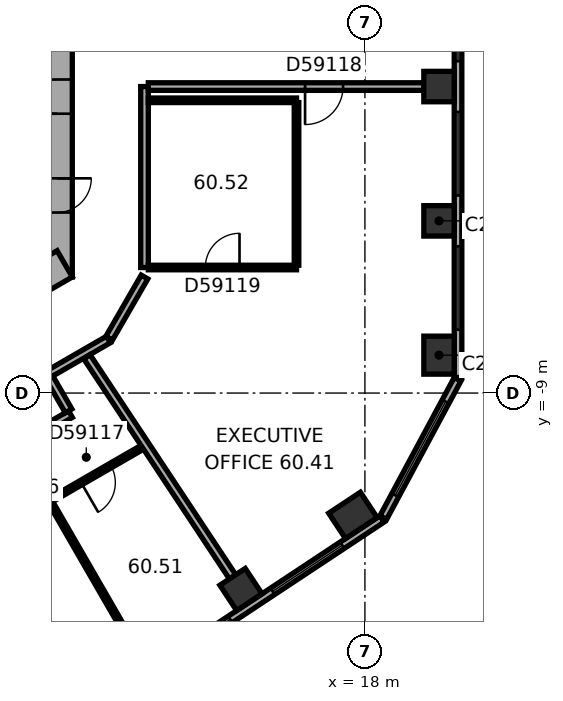
"""IFC4 building model, lengths in metres.
Left out: names, types, materials, properties, quantities, classifications, styles, units other than length and angle.
Written with IfcOpenShell. Run it as: python <this file> out.ifc"""

import sys

from ifc_helpers import new_model, si_unit, direction, frame, frame_2d, origin, origin_2d, place, context, subcontext, project, spatial, rectangle, extrude, element, fill, save


model = new_model("IFC4")
c1 = context("Model", 3, precision=1e-05, world=origin(), true_north=direction((0.0, 1.0)))
c2 = subcontext(c1, "Body", "Model", "MODEL_VIEW")
j1 = project(units=[si_unit("LENGTHUNIT", "METRE"), si_unit("PLANEANGLEUNIT", "RADIAN")], contexts=[c1])
p1 = place(None, origin())
s1 = spatial("IfcSite", under=j1, at=p1, CompositionType="ELEMENT")
p2 = place(p1, origin())
s2 = spatial("IfcBuilding", under=s1, at=p2, CompositionType="ELEMENT")
p3 = place(p2, frame((0.0, 0.0, 243.9)))
s3 = spatial("IfcBuildingStorey", under=s2, at=p3, CompositionType="ELEMENT", Elevation=243.9)
p4 = place(p3, frame((19.95, -8.003, 0.0), z_axis=(0.0, 0.0, 1.0), x_axis=(0.0, 1.0, 0.0)))
e1 = element("IfcColumn", 1, at=p4, inside=s3, PredefinedType="COLUMN", context=c2, shape_type="SweptSolid", body=[
    extrude(rectangle(XDim=1.0, YDim=0.8, at=origin_2d()), origin(), (0.0, 0.0, 1.0), 3.7),
])
for number, where, z_axis, x_axis in (
    (2, (19.95, -4.469, 0.0), (0.0, 0.0, 1.0), (0.0, 1.0, 0.0)),
    (3, (19.95, -0.936, 0.0), (0.0, 0.0, 1.0), (0.0, 1.0, 0.0)),
    (4, (14.738, -14.169, 0.0), (0.0, 0.0, 1.0), (0.834, 0.552, 0.0)),
):
    element("IfcColumn", number, at=place(p3, frame(where, z_axis=z_axis, x_axis=x_axis)), inside=s3, PredefinedType="COLUMN", context=c2, shape_type="SweptSolid", body=[
        extrude(rectangle(XDim=0.8, YDim=0.8, at=origin_2d()), origin(), (0.0, 0.0, 1.0), 3.7),
    ])
p5 = place(p3, frame((17.685, -12.219, 0.0), z_axis=(0.0, 0.0, 1.0), x_axis=(0.833885822067, 0.551936985312, 0.0)))
e5 = element("IfcColumn", 5, at=p5, inside=s3, PredefinedType="COLUMN", context=c2, shape_type="SweptSolid", body=[
    extrude(rectangle(XDim=1.0, YDim=0.8, at=origin_2d()), origin(), (0.0, 0.0, 1.0), 3.7),
])
p6 = place(p3, frame((9.9, -5.947, 0.0), z_axis=(0.0, 0.0, 1.0), x_axis=(0.0, 1.0, 0.0)))
e6 = element("IfcWall", 6, at=p6, inside=s3, PredefinedType="SHEAR", context=c2, shape_type="SweptSolid", body=[
    extrude(rectangle(XDim=11.894, YDim=0.8, at=frame_2d((5.947, 0.0))), origin(), (0.0, 0.0, 1.0), 3.7),
])
p7 = place(p6, frame((6.147, 0.0, 0.0)))
e7 = element("IfcOpeningElement", 7, at=p7, cuts=e6, PredefinedType="OPENING", context=c2, shape_type="SweptSolid", body=[
    extrude(rectangle(XDim=1.5, YDim=2.1, at=frame_2d((0.75, 1.05))), frame((0.0, 0.41, 0.0), z_axis=(0.0, -1.0, 0.0), x_axis=(1.0, 0.0, 0.0)), (0.0, 0.0, 1.0), 0.82),
])
p8 = place(p6, frame((1.697, 0.0, 0.0)))
e8 = element("IfcOpeningElement", 8, at=p8, cuts=e6, PredefinedType="OPENING", context=c2, shape_type="SweptSolid", body=[
    extrude(rectangle(XDim=0.9, YDim=2.1, at=frame_2d((0.45, 1.05))), frame((0.0, 0.41, 0.0), z_axis=(0.0, -1.0, 0.0), x_axis=(1.0, 0.0, 0.0)), (0.0, 0.0, 1.0), 0.82),
])
p9 = place(p6, frame((4.297, 0.0, 0.0)))
e9 = element("IfcOpeningElement", 9, at=p9, cuts=e6, PredefinedType="OPENING", context=c2, shape_type="SweptSolid", body=[
    extrude(rectangle(XDim=0.9, YDim=2.1, at=frame_2d((0.45, 1.05))), frame((0.0, 0.41, 0.0), z_axis=(0.0, -1.0, 0.0), x_axis=(1.0, 0.0, 0.0)), (0.0, 0.0, 1.0), 0.82),
])
p10 = place(p3, frame((-0.2, -11.547, 0.0), z_axis=(0.0, 0.0, 1.0), x_axis=(0.866023897231, 0.500002609418, 0.0)))
e10 = element("IfcWall", 10, at=p10, inside=s3, PredefinedType="SHEAR", context=c2, shape_type="SweptSolid", body=[
    extrude(rectangle(XDim=11.894, YDim=0.8, at=frame_2d((5.947, 0.0))), origin(), (0.0, 0.0, 1.0), 3.7),
])
p11 = place(p10, frame((2.497, 0.0, 0.0)))
e11 = element("IfcOpeningElement", 11, at=p11, cuts=e10, PredefinedType="OPENING", context=c2, shape_type="SweptSolid", body=[
    extrude(rectangle(XDim=1.1, YDim=2.1, at=frame_2d((0.55, 1.05))), frame((0.0, 0.41, 0.0), z_axis=(0.0, -1.0, 0.0), x_axis=(1.0, 0.0, 0.0)), (0.0, 0.0, 1.0), 0.82),
])
p12 = place(p10, frame((5.097, 0.0, 0.0)))
e12 = element("IfcOpeningElement", 12, at=p12, cuts=e10, PredefinedType="OPENING", context=c2, shape_type="SweptSolid", body=[
    extrude(rectangle(XDim=1.1, YDim=2.1, at=frame_2d((0.55, 1.05))), frame((0.0, 0.41, 0.0), z_axis=(0.0, -1.0, 0.0), x_axis=(1.0, 0.0, 0.0)), (0.0, 0.0, 1.0), 0.82),
])
p13 = place(p10, frame((7.697, 0.0, 0.0)))
e13 = element("IfcOpeningElement", 13, at=p13, cuts=e10, PredefinedType="OPENING", context=c2, shape_type="SweptSolid", body=[
    extrude(rectangle(XDim=1.1, YDim=2.1, at=frame_2d((0.55, 1.05))), frame((0.0, 0.41, 0.0), z_axis=(0.0, -1.0, 0.0), x_axis=(1.0, 0.0, 0.0)), (0.0, 0.0, 1.0), 0.82),
])
p14 = place(p3, frame((20.45, -8.59, 0.0), z_axis=(0.0, 0.0, 1.0), x_axis=(0.0, 1.0, 0.0)))
e14 = element("IfcWall", 14, at=p14, inside=s3, PredefinedType="STANDARD", context=c2, shape_type="SweptSolid", body=[
    extrude(rectangle(XDim=18.841, YDim=0.2, at=frame_2d((9.421, 0.0))), origin(), (0.0, 0.0, 1.0), 3.7),
])
p15 = place(p14, frame((1.254, 0.0, 0.9)))
e15 = element("IfcOpeningElement", 15, at=p15, cuts=e14, PredefinedType="OPENING", context=c2, shape_type="SweptSolid", body=[
    extrude(rectangle(XDim=2.2, YDim=2.0, at=frame_2d((1.1, 1.0))), frame((0.0, 0.11, 0.0), z_axis=(0.0, -1.0, 0.0), x_axis=(1.0, 0.0, 0.0)), (0.0, 0.0, 1.0), 0.22),
])
p16 = place(p14, frame((4.788, 0.0, 0.9)))
e16 = element("IfcOpeningElement", 16, at=p16, cuts=e14, PredefinedType="OPENING", context=c2, shape_type="SweptSolid", body=[
    extrude(rectangle(XDim=2.2, YDim=2.0, at=frame_2d((1.1, 1.0))), frame((0.0, 0.11, 0.0), z_axis=(0.0, -1.0, 0.0), x_axis=(1.0, 0.0, 0.0)), (0.0, 0.0, 1.0), 0.22),
])
p17 = place(p14, frame((8.322, 0.0, 0.9)))
e17 = element("IfcOpeningElement", 17, at=p17, cuts=e14, PredefinedType="OPENING", context=c2, shape_type="SweptSolid", body=[
    extrude(rectangle(XDim=2.2, YDim=2.0, at=frame_2d((1.1, 1.0))), frame((0.0, 0.11, 0.0), z_axis=(0.0, -1.0, 0.0), x_axis=(1.0, 0.0, 0.0)), (0.0, 0.0, 1.0), 0.22),
])
p18 = place(p14, frame((11.855, 0.0, 0.9)))
e18 = element("IfcOpeningElement", 18, at=p18, cuts=e14, PredefinedType="OPENING", context=c2, shape_type="SweptSolid", body=[
    extrude(rectangle(XDim=2.2, YDim=2.0, at=frame_2d((1.1, 1.0))), frame((0.0, 0.11, 0.0), z_axis=(0.0, -1.0, 0.0), x_axis=(1.0, 0.0, 0.0)), (0.0, 0.0, 1.0), 0.22),
])
p19 = place(p14, frame((15.389, 0.0, 0.9)))
e19 = element("IfcOpeningElement", 19, at=p19, cuts=e14, PredefinedType="OPENING", context=c2, shape_type="SweptSolid", body=[
    extrude(rectangle(XDim=2.2, YDim=2.0, at=frame_2d((1.1, 1.0))), frame((0.0, 0.11, 0.0), z_axis=(0.0, -1.0, 0.0), x_axis=(1.0, 0.0, 0.0)), (0.0, 0.0, 1.0), 0.22),
])
p20 = place(p3, frame((2.739, -22.711, 0.0), z_axis=(0.0, 0.0, 1.0), x_axis=(0.833885723098, 0.551937134838, 0.0)))
e20 = element("IfcWall", 20, at=p20, inside=s3, PredefinedType="STANDARD", context=c2, shape_type="SweptSolid", body=[
    extrude(rectangle(XDim=18.841, YDim=0.2, at=frame_2d((9.421, 0.0))), origin(), (0.0, 0.0, 1.0), 3.7),
])
p21 = place(p20, frame((1.252, 0.0, 0.9)))
e21 = element("IfcOpeningElement", 21, at=p21, cuts=e20, PredefinedType="OPENING", context=c2, shape_type="SweptSolid", body=[
    extrude(rectangle(XDim=2.2, YDim=2.0, at=frame_2d((1.1, 1.0))), frame((0.0, 0.11, 0.0), z_axis=(0.0, -1.0, 0.0), x_axis=(1.0, 0.0, 0.0)), (0.0, 0.0, 1.0), 0.22),
])
p22 = place(p20, frame((4.786, 0.0, 0.9)))
e22 = element("IfcOpeningElement", 22, at=p22, cuts=e20, PredefinedType="OPENING", context=c2, shape_type="SweptSolid", body=[
    extrude(rectangle(XDim=2.2, YDim=2.0, at=frame_2d((1.1, 1.0))), frame((0.0, 0.11, 0.0), z_axis=(0.0, -1.0, 0.0), x_axis=(1.0, 0.0, 0.0)), (0.0, 0.0, 1.0), 0.22),
])
p23 = place(p20, frame((8.32, 0.0, 0.9)))
e23 = element("IfcOpeningElement", 23, at=p23, cuts=e20, PredefinedType="OPENING", context=c2, shape_type="SweptSolid", body=[
    extrude(rectangle(XDim=2.2, YDim=2.0, at=frame_2d((1.1, 1.0))), frame((0.0, 0.11, 0.0), z_axis=(0.0, -1.0, 0.0), x_axis=(1.0, 0.0, 0.0)), (0.0, 0.0, 1.0), 0.22),
])
p24 = place(p20, frame((11.854, 0.0, 0.9)))
e24 = element("IfcOpeningElement", 24, at=p24, cuts=e20, PredefinedType="OPENING", context=c2, shape_type="SweptSolid", body=[
    extrude(rectangle(XDim=2.2, YDim=2.0, at=frame_2d((1.1, 1.0))), frame((0.0, 0.11, 0.0), z_axis=(0.0, -1.0, 0.0), x_axis=(1.0, 0.0, 0.0)), (0.0, 0.0, 1.0), 0.22),
])
p25 = place(p20, frame((15.387, 0.0, 0.9)))
e25 = element("IfcOpeningElement", 25, at=p25, cuts=e20, PredefinedType="OPENING", context=c2, shape_type="SweptSolid", body=[
    extrude(rectangle(XDim=2.2, YDim=2.0, at=frame_2d((1.1, 1.0))), frame((0.0, 0.11, 0.0), z_axis=(0.0, -1.0, 0.0), x_axis=(1.0, 0.0, 0.0)), (0.0, 0.0, 1.0), 0.22),
])
p26 = place(p3, frame((18.483, -12.276, 0.0), z_axis=(0.0, 0.0, 1.0), x_axis=(0.473267675015, 0.880918672629, 0.0)))
e26 = element("IfcWall", 26, at=p26, inside=s3, PredefinedType="STANDARD", context=c2, shape_type="SweptSolid", body=[
    extrude(rectangle(XDim=4.13, YDim=0.2, at=frame_2d((2.065, 0.0))), origin(), (0.0, 0.0, 1.0), 3.7),
])
p27 = place(p26, frame((0.665, 0.0, 0.9)))
e27 = element("IfcOpeningElement", 27, at=p27, cuts=e26, PredefinedType="OPENING", context=c2, shape_type="SweptSolid", body=[
    extrude(rectangle(XDim=2.8, YDim=2.0, at=frame_2d((1.4, 1.0))), frame((0.0, 0.11, 0.0), z_axis=(0.0, -1.0, 0.0), x_axis=(1.0, 0.0, 0.0)), (0.0, 0.0, 1.0), 0.22),
])
p28 = place(p3, frame((2.716, -13.906, 0.0), z_axis=(0.0, 0.0, 1.0), x_axis=(0.866040290674, 0.499974214264, 0.0)))
e28 = element("IfcWall", 28, at=p28, inside=s3, PredefinedType="PARTITIONING", context=c2, shape_type="SweptSolid", body=[
    extrude(rectangle(XDim=8.702, YDim=0.2, at=frame_2d((4.351, 0.0))), origin(), (0.0, 0.0, 1.0), 3.42),
])
p29 = place(p28, frame((5.26, 0.0, 0.0)))
e29 = element("IfcOpeningElement", 29, at=p29, cuts=e28, PredefinedType="OPENING", context=c2, shape_type="SweptSolid", body=[
    extrude(rectangle(XDim=1.0, YDim=2.1, at=frame_2d((0.5, 1.05))), frame((0.0, 0.11, 0.0), z_axis=(0.0, -1.0, 0.0), x_axis=(1.0, 0.0, 0.0)), (0.0, 0.0, 1.0), 0.22),
])
p30 = place(p3, frame((6.183, -13.867, 0.0), z_axis=(0.0, 0.0, 1.0), x_axis=(0.866031365477, 0.499989673903, 0.0)))
e30 = element("IfcWall", 30, at=p30, inside=s3, PredefinedType="PARTITIONING", context=c2, shape_type="SweptSolid", body=[
    extrude(rectangle(XDim=6.881, YDim=0.12, at=frame_2d((3.44, 0.0))), origin(), (0.0, 0.0, 1.0), 3.42),
])
p31 = place(p30, frame((0.5, 0.0, 0.0)))
e31 = element("IfcOpeningElement", 31, at=p31, cuts=e30, PredefinedType="OPENING", context=c2, shape_type="SweptSolid", body=[
    extrude(rectangle(XDim=1.0, YDim=2.1, at=frame_2d((0.5, 1.05))), frame((0.0, 0.07, 0.0), z_axis=(0.0, -1.0, 0.0), x_axis=(1.0, 0.0, 0.0)), (0.0, 0.0, 1.0), 0.14),
])
p32 = place(p30, frame((2.583, 0.0, 0.0)))
e32 = element("IfcOpeningElement", 32, at=p32, cuts=e30, PredefinedType="OPENING", context=c2, shape_type="SweptSolid", body=[
    extrude(rectangle(XDim=0.9, YDim=2.1, at=frame_2d((0.45, 1.05))), frame((0.0, 0.07, 0.0), z_axis=(0.0, -1.0, 0.0), x_axis=(1.0, 0.0, 0.0)), (0.0, 0.0, 1.0), 0.14),
])
p33 = place(p30, frame((5.023, 0.0, 0.0)))
e33 = element("IfcOpeningElement", 33, at=p33, cuts=e30, PredefinedType="OPENING", context=c2, shape_type="SweptSolid", body=[
    extrude(rectangle(XDim=0.9, YDim=2.1, at=frame_2d((0.45, 1.05))), frame((0.0, 0.07, 0.0), z_axis=(0.0, -1.0, 0.0), x_axis=(1.0, 0.0, 0.0)), (0.0, 0.0, 1.0), 0.14),
])
p34 = place(p3, frame((9.652, -8.515, 0.0), z_axis=(0.0, 0.0, 1.0), x_axis=(0.866020375458, 0.500008709215, 0.0)))
e34 = element("IfcWall", 34, at=p34, inside=s3, PredefinedType="PARTITIONING", context=c2, shape_type="SweptSolid", body=[
    extrude(rectangle(XDim=1.846, YDim=0.2, at=frame_2d((0.923, 0.0))), origin(), (0.0, 0.0, 1.0), 3.42),
])
p35 = place(p3, frame((10.202, -9.469, 0.0), z_axis=(0.0, 0.0, 1.0), x_axis=(-0.499968756647, 0.866043441391, 0.0)))
e35 = element("IfcWall", 35, at=p35, inside=s3, PredefinedType="PARTITIONING", context=c2, shape_type="SweptSolid", body=[
    extrude(rectangle(XDim=1.001, YDim=0.2, at=frame_2d((0.5, 0.0))), origin(), (0.0, 0.0, 1.0), 3.42),
])
p36 = place(p3, frame((11.27, -7.558, 0.0), z_axis=(0.0, 0.0, 1.0), x_axis=(0.499964847546, 0.866045698112, 0.0)))
e36 = element("IfcWall", 36, at=p36, inside=s3, PredefinedType="PARTITIONING", context=c2, shape_type="SweptSolid", body=[
    extrude(rectangle(XDim=1.86, YDim=0.2, at=frame_2d((0.93, 0.0))), origin(), (0.0, 0.0, 1.0), 3.42),
])
p37 = place(p3, frame((11.87, -15.588, 0.0), z_axis=(0.0, 0.0, 1.0), x_axis=(-0.49999774064, 0.866026708223, 0.0)))
e37 = element("IfcWall", 37, at=p37, inside=s3, PredefinedType="PARTITIONING", context=c2, shape_type="SweptSolid", body=[
    extrude(rectangle(XDim=4.273, YDim=0.12, at=frame_2d((2.137, 0.0))), origin(), (0.0, 0.0, 1.0), 3.42),
])
p38 = place(p3, frame((12.2, -5.697, 0.0), z_axis=(0.0, 0.0, 1.0), x_axis=(0.0, 1.0, 0.0)))
e38 = element("IfcWall", 38, at=p38, inside=s3, PredefinedType="PARTITIONING", context=c2, shape_type="SweptSolid", body=[
    extrude(rectangle(XDim=4.761, YDim=0.2, at=frame_2d((2.381, 0.0))), origin(), (0.0, 0.0, 1.0), 3.42),
])
p39 = place(p3, frame((12.3, -1.297, 0.0), z_axis=(0.0, 0.0, 1.0), x_axis=(1.0, 0.0, 0.0)))
e39 = element("IfcWall", 39, at=p39, inside=s3, PredefinedType="PARTITIONING", context=c2, shape_type="SweptSolid", body=[
    extrude(rectangle(XDim=3.9, YDim=0.12, at=frame_2d((1.95, 0.0))), origin(), (0.0, 0.0, 1.0), 3.42),
])
p40 = place(p3, frame((12.3, -0.936, 0.0), z_axis=(0.0, 0.0, 1.0), x_axis=(1.0, 0.0, 0.0)))
e40 = element("IfcWall", 40, at=p40, inside=s3, PredefinedType="PARTITIONING", context=c2, shape_type="SweptSolid", body=[
    extrude(rectangle(XDim=7.25, YDim=0.2, at=frame_2d((3.625, 0.0))), origin(), (0.0, 0.0, 1.0), 2.87),
])
p41 = place(p40, frame((4.125, 0.0, 0.0)))
e41 = element("IfcOpeningElement", 41, at=p41, cuts=e40, PredefinedType="OPENING", context=c2, shape_type="SweptSolid", body=[
    extrude(rectangle(XDim=1.0, YDim=2.1, at=frame_2d((0.5, 1.05))), frame((0.0, 0.11, 0.0), z_axis=(0.0, -1.0, 0.0), x_axis=(1.0, 0.0, 0.0)), (0.0, 0.0, 1.0), 0.22),
])
p42 = place(p3, frame((14.517, -13.836, 0.0), z_axis=(0.0, 0.0, 1.0), x_axis=(-0.551938455794, 0.833884848775, 0.0)))
e42 = element("IfcWall", 42, at=p42, inside=s3, PredefinedType="PARTITIONING", context=c2, shape_type="SweptSolid", body=[
    extrude(rectangle(XDim=6.944, YDim=0.2, at=frame_2d((3.472, 0.0))), origin(), (0.0, 0.0, 1.0), 2.87),
])
p43 = place(p3, frame((16.2, -5.697, 0.0), z_axis=(0.0, 0.0, 1.0), x_axis=(-1.0, 0.0, 0.0)))
e43 = element("IfcWall", 43, at=p43, inside=s3, PredefinedType="PARTITIONING", context=c2, shape_type="SweptSolid", body=[
    extrude(rectangle(XDim=3.9, YDim=0.12, at=frame_2d((1.95, 0.0))), origin(), (0.0, 0.0, 1.0), 3.42),
])
p44 = place(p43, frame((1.5, 0.0, 0.0)))
e44 = element("IfcOpeningElement", 44, at=p44, cuts=e43, PredefinedType="OPENING", context=c2, shape_type="SweptSolid", body=[
    extrude(rectangle(XDim=0.9, YDim=2.1, at=frame_2d((0.45, 1.05))), frame((0.0, 0.07, 0.0), z_axis=(0.0, -1.0, 0.0), x_axis=(1.0, 0.0, 0.0)), (0.0, 0.0, 1.0), 0.14),
])
p45 = place(p3, frame((16.2, -1.357, 0.0), z_axis=(0.0, 0.0, 1.0), x_axis=(0.0, -1.0, 0.0)))
e45 = element("IfcWall", 45, at=p45, inside=s3, PredefinedType="PARTITIONING", context=c2, shape_type="SweptSolid", body=[
    extrude(rectangle(XDim=4.28, YDim=0.12, at=frame_2d((2.14, 0.0))), origin(), (0.0, 0.0, 1.0), 3.42),
])
p46 = place(p15, origin())
e46 = element("IfcWindow", 46, at=p46, inside=s3, PartitioningType="SINGLE_PANEL", PredefinedType="WINDOW", context=c2, shape_type="SweptSolid", body=[
    extrude(rectangle(XDim=2.2, YDim=2.0, at=frame_2d((1.1, 1.0))), frame((0.0, 0.03, 0.0), z_axis=(0.0, -1.0, 0.0), x_axis=(1.0, 0.0, 0.0)), (0.0, 0.0, 1.0), 0.06),
])
fill(e15, e46)
p47 = place(p16, origin())
e47 = element("IfcWindow", 47, at=p47, inside=s3, PartitioningType="SINGLE_PANEL", PredefinedType="WINDOW", context=c2, shape_type="SweptSolid", body=[
    extrude(rectangle(XDim=2.2, YDim=2.0, at=frame_2d((1.1, 1.0))), frame((0.0, 0.03, 0.0), z_axis=(0.0, -1.0, 0.0), x_axis=(1.0, 0.0, 0.0)), (0.0, 0.0, 1.0), 0.06),
])
fill(e16, e47)
p48 = place(p17, origin())
e48 = element("IfcWindow", 48, at=p48, inside=s3, PartitioningType="SINGLE_PANEL", PredefinedType="WINDOW", context=c2, shape_type="SweptSolid", body=[
    extrude(rectangle(XDim=2.2, YDim=2.0, at=frame_2d((1.1, 1.0))), frame((0.0, 0.03, 0.0), z_axis=(0.0, -1.0, 0.0), x_axis=(1.0, 0.0, 0.0)), (0.0, 0.0, 1.0), 0.06),
])
fill(e17, e48)
p49 = place(p24, origin())
e49 = element("IfcWindow", 49, at=p49, inside=s3, PartitioningType="SINGLE_PANEL", PredefinedType="WINDOW", context=c2, shape_type="SweptSolid", body=[
    extrude(rectangle(XDim=2.2, YDim=2.0, at=frame_2d((1.1, 1.0))), frame((0.0, 0.03, 0.0), z_axis=(0.0, -1.0, 0.0), x_axis=(1.0, 0.0, 0.0)), (0.0, 0.0, 1.0), 0.06),
])
fill(e24, e49)
p50 = place(p25, origin())
e50 = element("IfcWindow", 50, at=p50, inside=s3, PartitioningType="SINGLE_PANEL", PredefinedType="WINDOW", context=c2, shape_type="SweptSolid", body=[
    extrude(rectangle(XDim=2.2, YDim=2.0, at=frame_2d((1.1, 1.0))), frame((0.0, 0.03, 0.0), z_axis=(0.0, -1.0, 0.0), x_axis=(1.0, 0.0, 0.0)), (0.0, 0.0, 1.0), 0.06),
])
fill(e25, e50)
p51 = place(p27, origin())
e51 = element("IfcWindow", 51, at=p51, inside=s3, PartitioningType="SINGLE_PANEL", PredefinedType="WINDOW", context=c2, shape_type="SweptSolid", body=[
    extrude(rectangle(XDim=2.8, YDim=2.0, at=frame_2d((1.4, 1.0))), frame((0.0, 0.03, 0.0), z_axis=(0.0, -1.0, 0.0), x_axis=(1.0, 0.0, 0.0)), (0.0, 0.0, 1.0), 0.06),
])
fill(e27, e51)
p52 = place(p8, origin())
e52 = element("IfcDoor", 52, at=p52, inside=s3, OperationType="SINGLE_SWING_LEFT", PredefinedType="DOOR", context=c2, shape_type="SweptSolid", body=[
    extrude(rectangle(XDim=0.9, YDim=2.1, at=frame_2d((0.45, 1.05))), frame((0.0, 0.025, 0.0), z_axis=(0.0, -1.0, 0.0), x_axis=(1.0, 0.0, 0.0)), (0.0, 0.0, 1.0), 0.05),
])
fill(e8, e52)
p53 = place(p9, origin())
e53 = element("IfcDoor", 53, at=p53, inside=s3, OperationType="SINGLE_SWING_LEFT", PredefinedType="DOOR", context=c2, shape_type="SweptSolid", body=[
    extrude(rectangle(XDim=0.9, YDim=2.1, at=frame_2d((0.45, 1.05))), frame((0.0, 0.025, 0.0), z_axis=(0.0, -1.0, 0.0), x_axis=(1.0, 0.0, 0.0)), (0.0, 0.0, 1.0), 0.05),
])
fill(e9, e53)
p54 = place(p33, origin())
e54 = element("IfcDoor", 54, at=p54, inside=s3, OperationType="SINGLE_SWING_LEFT", PredefinedType="DOOR", context=c2, shape_type="SweptSolid", body=[
    extrude(rectangle(XDim=0.9, YDim=2.1, at=frame_2d((0.45, 1.05))), frame((0.0, 0.025, 0.0), z_axis=(0.0, -1.0, 0.0), x_axis=(1.0, 0.0, 0.0)), (0.0, 0.0, 1.0), 0.05),
])
fill(e33, e54)
p55 = place(p41, origin())
e55 = element("IfcDoor", 55, at=p55, inside=s3, OperationType="SINGLE_SWING_LEFT", PredefinedType="DOOR", context=c2, shape_type="SweptSolid", body=[
    extrude(rectangle(XDim=1.0, YDim=2.1, at=frame_2d((0.5, 1.05))), frame((0.0, 0.025, 0.0), z_axis=(0.0, -1.0, 0.0), x_axis=(1.0, 0.0, 0.0)), (0.0, 0.0, 1.0), 0.05),
])
fill(e41, e55)
p56 = place(p44, origin())
e56 = element("IfcDoor", 56, at=p56, inside=s3, OperationType="SINGLE_SWING_LEFT", PredefinedType="DOOR", context=c2, shape_type="SweptSolid", body=[
    extrude(rectangle(XDim=0.9, YDim=2.1, at=frame_2d((0.45, 1.05))), frame((0.0, 0.025, 0.0), z_axis=(0.0, -1.0, 0.0), x_axis=(1.0, 0.0, 0.0)), (0.0, 0.0, 1.0), 0.05),
])
fill(e44, e56)
save(model, sys.argv[1])
